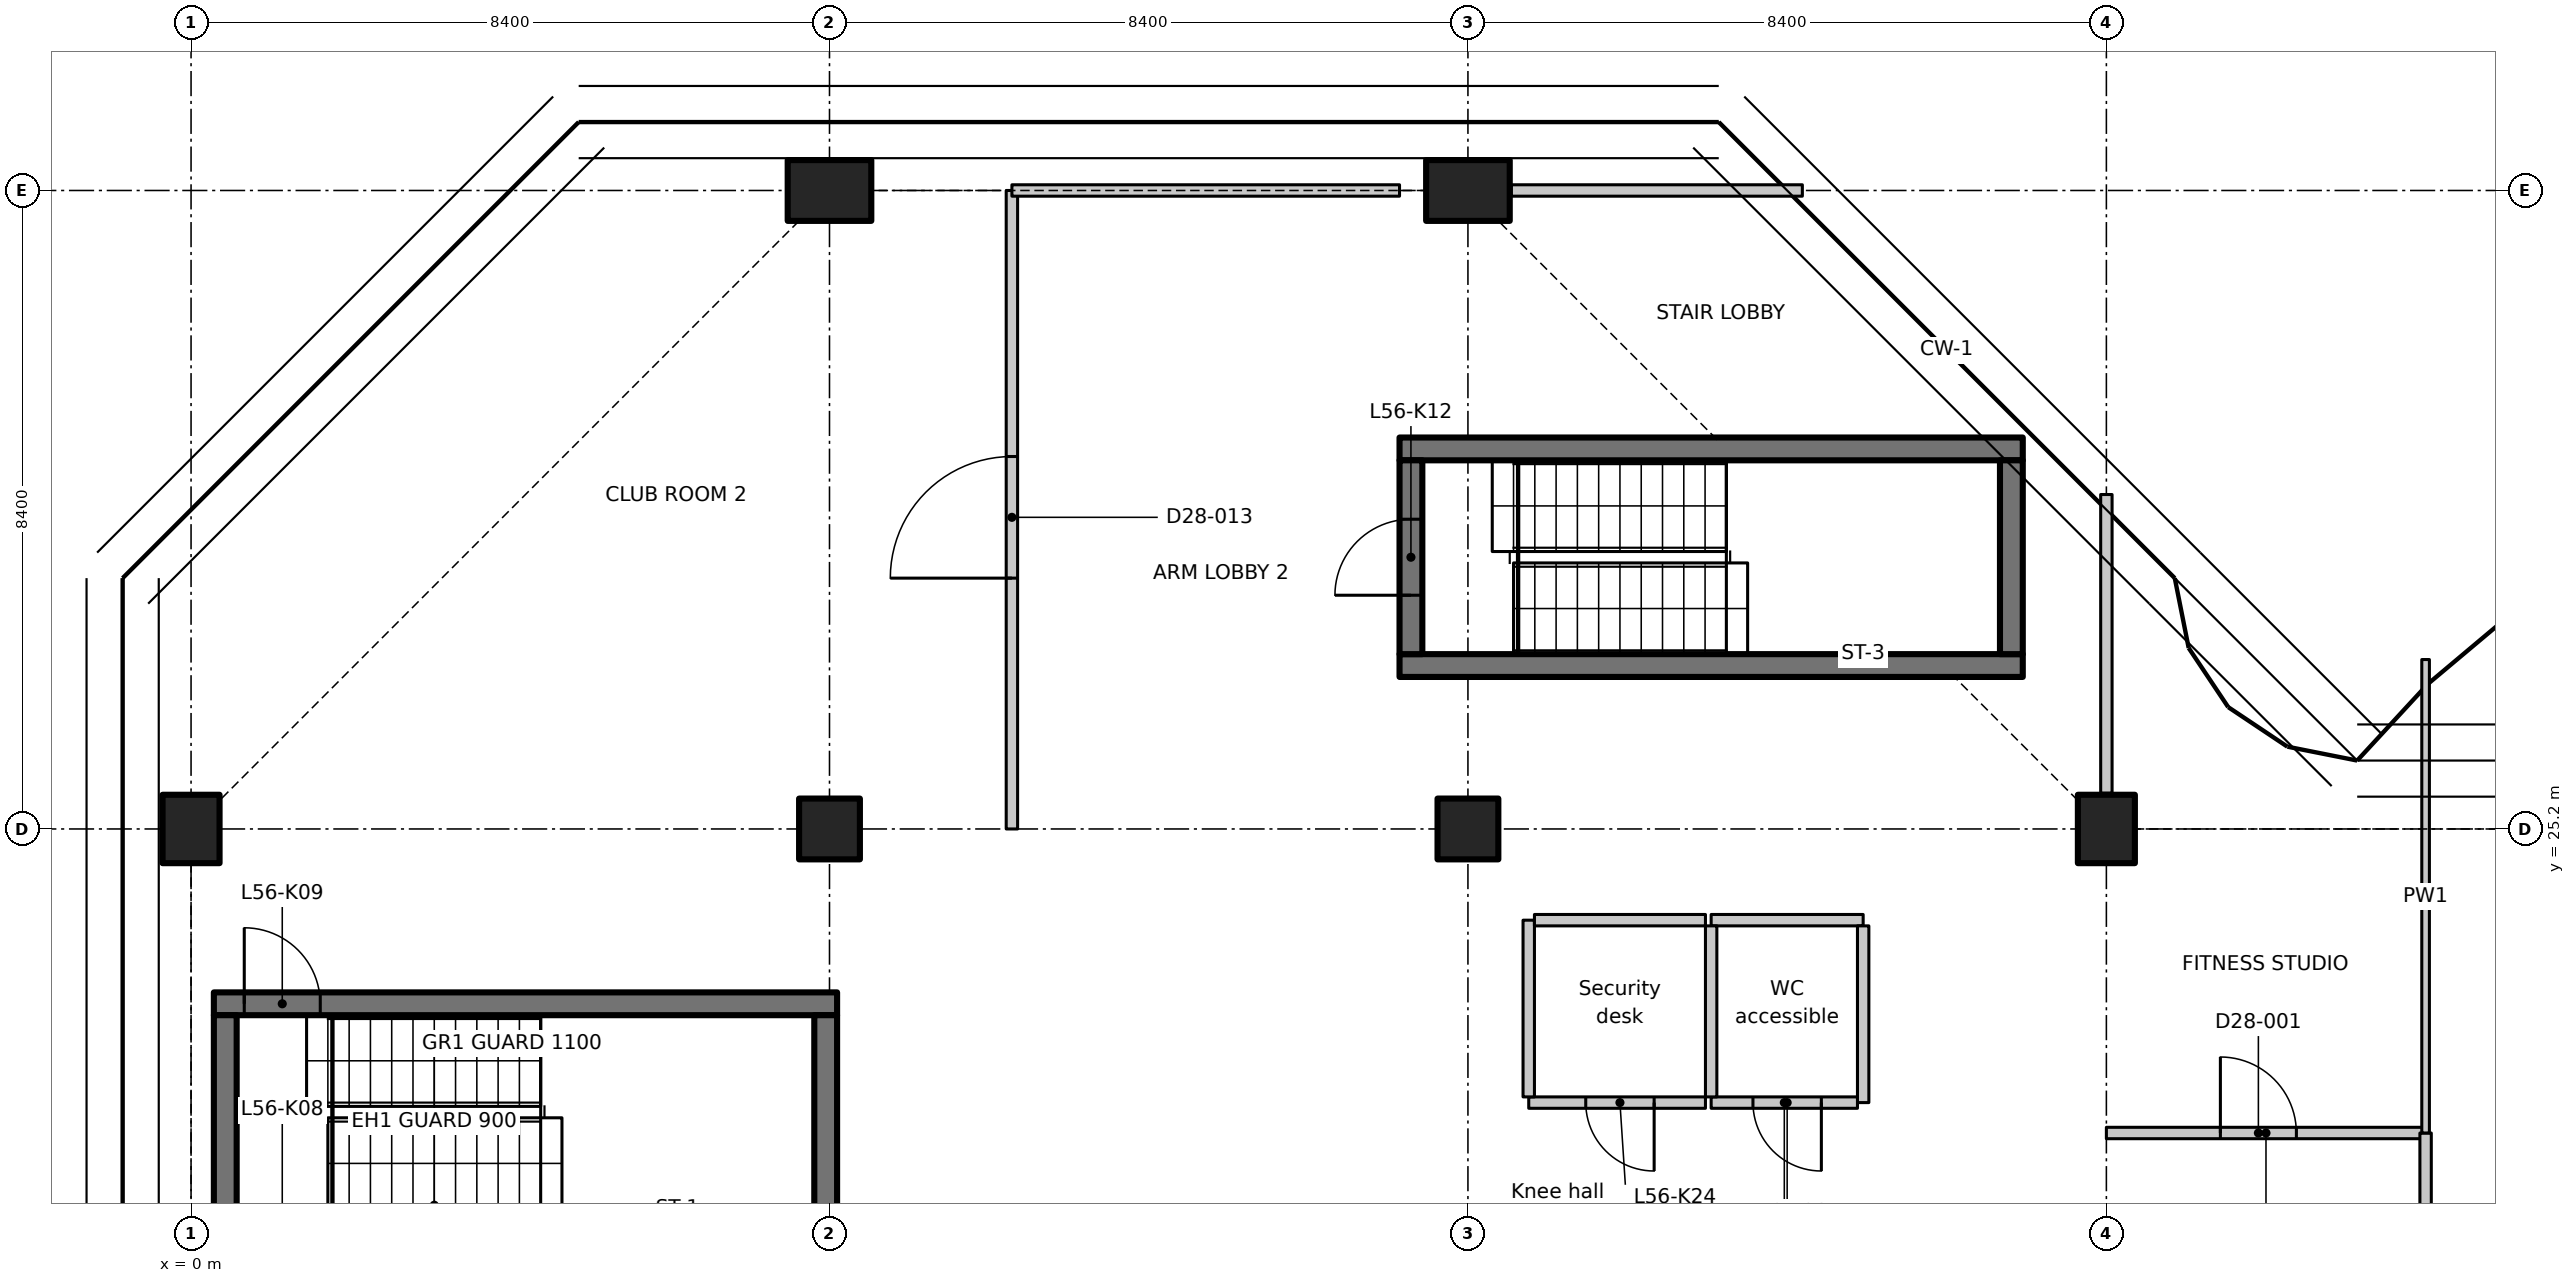
"""IFC4 building model, lengths in metres.
Left out: names, types, materials, properties, quantities, classifications, styles, units other than length and angle.
Written with IfcOpenShell. Run it as: python <this file> out.ifc"""

import sys

from ifc_helpers import new_model, si_unit, direction, frame, frame_2d, origin, origin_2d, place, context, subcontext, project, spatial, polyline, rectangle, outline, extrude, element, fill, save


model = new_model("IFC4")
c1 = context("Model", 3, precision=1e-05, world=origin(), true_north=direction((0.0, 1.0)))
c2 = subcontext(c1, "Body", "Model", "MODEL_VIEW")
j1 = project(units=[si_unit("LENGTHUNIT", "METRE"), si_unit("PLANEANGLEUNIT", "RADIAN")], contexts=[c1])
p1 = place(None, origin())
s1 = spatial("IfcSite", under=j1, at=p1, CompositionType="ELEMENT")
p2 = place(p1, origin())
s2 = spatial("IfcBuilding", under=s1, at=p2, CompositionType="ELEMENT")
p3 = place(p2, frame((0.0, 0.0, 222.9)))
s3 = spatial("IfcBuildingStorey", under=s2, at=p3, CompositionType="ELEMENT", Elevation=222.9)
p4 = place(p3, frame((0.0, 25.2, 0.0), z_axis=(0.0, 0.0, 1.0), x_axis=(1.0, 0.0, 0.0)))
e1 = element("IfcColumn", 1, at=p4, inside=s3, PredefinedType="COLUMN", context=c2, shape_type="SweptSolid", body=[
    extrude(rectangle(XDim=0.75, YDim=0.9, at=origin_2d()), origin(), (0.0, 0.0, 1.0), 3.35),
])
p5 = place(p3, frame((8.4, 25.2, 0.0), z_axis=(0.0, 0.0, 1.0), x_axis=(1.0, 0.0, 0.0)))
e2 = element("IfcColumn", 2, at=p5, inside=s3, PredefinedType="COLUMN", context=c2, shape_type="SweptSolid", body=[
    extrude(rectangle(XDim=0.8, YDim=0.8, at=origin_2d()), origin(), (0.0, 0.0, 1.0), 3.35),
])
p6 = place(p3, frame((8.4, 33.6, 0.0), z_axis=(0.0, 0.0, 1.0), x_axis=(0.0, 1.0, 0.0)))
e3 = element("IfcColumn", 3, at=p6, inside=s3, PredefinedType="COLUMN", context=c2, shape_type="SweptSolid", body=[
    extrude(rectangle(XDim=0.8, YDim=1.1, at=origin_2d()), origin(), (0.0, 0.0, 1.0), 3.35),
])
p7 = place(p3, frame((16.8, 25.2, 0.0), z_axis=(0.0, 0.0, 1.0), x_axis=(1.0, 0.0, 0.0)))
e4 = element("IfcColumn", 4, at=p7, inside=s3, PredefinedType="COLUMN", context=c2, shape_type="SweptSolid", body=[
    extrude(rectangle(XDim=0.8, YDim=0.8, at=origin_2d()), origin(), (0.0, 0.0, 1.0), 3.35),
])
p8 = place(p3, frame((16.8, 33.6, 0.0), z_axis=(0.0, 0.0, 1.0), x_axis=(0.0, 1.0, 0.0)))
e5 = element("IfcColumn", 5, at=p8, inside=s3, PredefinedType="COLUMN", context=c2, shape_type="SweptSolid", body=[
    extrude(rectangle(XDim=0.8, YDim=1.1, at=origin_2d()), origin(), (0.0, 0.0, 1.0), 3.35),
])
p9 = place(p3, frame((25.2, 25.2, 0.0), z_axis=(0.0, 0.0, 1.0), x_axis=(1.0, 0.0, 0.0)))
e6 = element("IfcColumn", 6, at=p9, inside=s3, PredefinedType="COLUMN", context=c2, shape_type="SweptSolid", body=[
    extrude(rectangle(XDim=0.75, YDim=0.9, at=origin_2d()), origin(), (0.0, 0.0, 1.0), 3.35),
])
p10 = place(p3, frame((0.3, 22.9, 0.0), z_axis=(0.0, 0.0, 1.0), x_axis=(1.0, 0.0, 0.0)))
e7 = element("IfcWall", 7, at=p10, inside=s3, PredefinedType="SHEAR", context=c2, shape_type="SweptSolid", body=[
    extrude(rectangle(XDim=8.2, YDim=0.3, at=frame_2d((4.1, 0.0))), origin(), (0.0, 0.0, 1.0), 3.35),
])
p11 = place(p10, frame((0.4, 0.0, 0.0)))
e8 = element("IfcOpeningElement", 8, at=p11, cuts=e7, PredefinedType="OPENING", context=c2, shape_type="SweptSolid", body=[
    extrude(rectangle(XDim=1.0, YDim=2.1, at=frame_2d((0.5, 1.05))), frame((0.0, 0.16, 0.0), z_axis=(0.0, -1.0, 0.0), x_axis=(1.0, 0.0, 0.0)), (0.0, 0.0, 1.0), 0.32),
])
for number, where, z_axis, x_axis in (
    (9, (0.45, 20.2, 0.0), (0.0, 0.0, 1.0), (0.0, 1.0, 0.0)),
    (10, (8.35, 20.2, 0.0), (0.0, 0.0, 1.0), (0.0, 1.0, 0.0)),
):
    element("IfcWall", number, at=place(p3, frame(where, z_axis=z_axis, x_axis=x_axis)), inside=s3, PredefinedType="SHEAR", context=c2, shape_type="SweptSolid", body=[
        extrude(rectangle(XDim=2.55, YDim=0.3, at=frame_2d((1.275, 0.0))), origin(), (0.0, 0.0, 1.0), 3.35),
    ])
for number, where, z_axis, x_axis in (
    (11, (15.9, 27.35, 0.0), (0.0, 0.0, 1.0), (1.0, 0.0, 0.0)),
    (12, (15.9, 30.2, 0.0), (0.0, 0.0, 1.0), (1.0, 0.0, 0.0)),
):
    element("IfcWall", number, at=place(p3, frame(where, z_axis=z_axis, x_axis=x_axis)), inside=s3, PredefinedType="SHEAR", context=c2, shape_type="SweptSolid", body=[
        extrude(rectangle(XDim=8.2, YDim=0.3, at=frame_2d((4.1, 0.0))), origin(), (0.0, 0.0, 1.0), 3.35),
    ])
p12 = place(p3, frame((16.05, 27.5, 0.0), z_axis=(0.0, 0.0, 1.0), x_axis=(0.0, 1.0, 0.0)))
e13 = element("IfcWall", 13, at=p12, inside=s3, PredefinedType="SHEAR", context=c2, shape_type="SweptSolid", body=[
    extrude(rectangle(XDim=2.55, YDim=0.3, at=frame_2d((1.275, 0.0))), origin(), (0.0, 0.0, 1.0), 3.35),
])
p13 = place(p12, frame((0.775, 0.0, 0.0)))
e14 = element("IfcOpeningElement", 14, at=p13, cuts=e13, PredefinedType="OPENING", context=c2, shape_type="SweptSolid", body=[
    extrude(rectangle(XDim=1.0, YDim=2.1, at=frame_2d((0.5, 1.05))), frame((0.0, 0.16, 0.0), z_axis=(0.0, -1.0, 0.0), x_axis=(1.0, 0.0, 0.0)), (0.0, 0.0, 1.0), 0.32),
])
p14 = place(p3, frame((23.95, 27.5, 0.0), z_axis=(0.0, 0.0, 1.0), x_axis=(0.0, 1.0, 0.0)))
e15 = element("IfcWall", 15, at=p14, inside=s3, PredefinedType="SHEAR", context=c2, shape_type="SweptSolid", body=[
    extrude(rectangle(XDim=2.55, YDim=0.3, at=frame_2d((1.275, 0.0))), origin(), (0.0, 0.0, 1.0), 3.35),
])
p15 = place(p3, frame((20.0, 24.0, 0.0), z_axis=(0.0, 0.0, 1.0), x_axis=(1.0, 0.0, 0.0)))
e16 = element("IfcWall", 16, at=p15, inside=s3, PredefinedType="PARTITIONING", context=c2, shape_type="SweptSolid", body=[
    extrude(rectangle(XDim=2.0, YDim=0.15, at=frame_2d((1.0, 0.0))), origin(), (0.0, 0.0, 1.0), 3.35),
])
p16 = place(p3, frame((22.0, 23.925, 0.0), z_axis=(0.0, 0.0, 1.0), x_axis=(0.0, -1.0, 0.0)))
e17 = element("IfcWall", 17, at=p16, inside=s3, PredefinedType="PARTITIONING", context=c2, shape_type="SweptSolid", body=[
    extrude(rectangle(XDim=2.325, YDim=0.15, at=frame_2d((1.163, 0.0))), origin(), (0.0, 0.0, 1.0), 3.35),
])
p17 = place(p3, frame((21.925, 21.6, 0.0), z_axis=(0.0, 0.0, 1.0), x_axis=(-1.0, 0.0, 0.0)))
e18 = element("IfcWall", 18, at=p17, inside=s3, PredefinedType="PARTITIONING", context=c2, shape_type="SweptSolid", body=[
    extrude(rectangle(XDim=1.925, YDim=0.15, at=frame_2d((0.962, 0.0))), origin(), (0.0, 0.0, 1.0), 3.35),
])
p18 = place(p17, frame((0.475, 0.0, 0.0)))
e19 = element("IfcOpeningElement", 19, at=p18, cuts=e18, PredefinedType="OPENING", context=c2, shape_type="SweptSolid", body=[
    extrude(rectangle(XDim=0.9, YDim=2.1, at=frame_2d((0.45, 1.05))), frame((0.0, 0.085, 0.0), z_axis=(0.0, -1.0, 0.0), x_axis=(1.0, 0.0, 0.0)), (0.0, 0.0, 1.0), 0.17),
])
p19 = place(p3, frame((20.0, 21.675, 0.0), z_axis=(0.0, 0.0, 1.0), x_axis=(0.0, 1.0, 0.0)))
e20 = element("IfcWall", 20, at=p19, inside=s3, PredefinedType="PARTITIONING", context=c2, shape_type="SweptSolid", body=[
    extrude(rectangle(XDim=2.25, YDim=0.15, at=frame_2d((1.125, 0.0))), origin(), (0.0, 0.0, 1.0), 3.35),
])
p20 = place(p3, frame((19.925, 21.6, 0.0), z_axis=(0.0, 0.0, 1.0), x_axis=(-1.0, 0.0, 0.0)))
e21 = element("IfcWall", 21, at=p20, inside=s3, PredefinedType="PARTITIONING", context=c2, shape_type="SweptSolid", body=[
    extrude(rectangle(XDim=2.325, YDim=0.15, at=frame_2d((1.163, 0.0))), origin(), (0.0, 0.0, 1.0), 3.35),
])
p21 = place(p20, frame((0.675, 0.0, 0.0)))
e22 = element("IfcOpeningElement", 22, at=p21, cuts=e21, PredefinedType="OPENING", context=c2, shape_type="SweptSolid", body=[
    extrude(rectangle(XDim=0.9, YDim=2.1, at=frame_2d((0.45, 1.05))), frame((0.0, 0.085, 0.0), z_axis=(0.0, -1.0, 0.0), x_axis=(1.0, 0.0, 0.0)), (0.0, 0.0, 1.0), 0.17),
])
p22 = place(p3, frame((17.6, 21.675, 0.0), z_axis=(0.0, 0.0, 1.0), x_axis=(0.0, 1.0, 0.0)))
e23 = element("IfcWall", 23, at=p22, inside=s3, PredefinedType="PARTITIONING", context=c2, shape_type="SweptSolid", body=[
    extrude(rectangle(XDim=2.325, YDim=0.15, at=frame_2d((1.163, 0.0))), origin(), (0.0, 0.0, 1.0), 3.35),
])
p23 = place(p3, frame((17.675, 24.0, 0.0), z_axis=(0.0, 0.0, 1.0), x_axis=(1.0, 0.0, 0.0)))
e24 = element("IfcWall", 24, at=p23, inside=s3, PredefinedType="PARTITIONING", context=c2, shape_type="SweptSolid", body=[
    extrude(rectangle(XDim=2.25, YDim=0.15, at=frame_2d((1.125, 0.0))), origin(), (0.0, 0.0, 1.0), 3.35),
])
p24 = place(p3, frame((25.2, 21.2, 0.0), z_axis=(0.0, 0.0, 1.0), x_axis=(1.0, 0.0, 0.0)))
e25 = element("IfcWall", 25, at=p24, inside=s3, PredefinedType="PARTITIONING", context=c2, shape_type="SweptSolid", body=[
    extrude(rectangle(XDim=4.2, YDim=0.15, at=frame_2d((2.1, 0.0))), origin(), (0.0, 0.0, 1.0), 3.33),
])
p25 = place(p24, frame((1.5, 0.0, 0.0)))
e26 = element("IfcOpeningElement", 26, at=p25, cuts=e25, PredefinedType="OPENING", context=c2, shape_type="SweptSolid", body=[
    extrude(rectangle(XDim=1.0, YDim=2.1, at=frame_2d((0.5, 1.05))), frame((0.0, 0.085, 0.0), z_axis=(0.0, -1.0, 0.0), x_axis=(1.0, 0.0, 0.0)), (0.0, 0.0, 1.0), 0.17),
])
p26 = place(p3, frame((29.4, 21.2, 0.0), z_axis=(0.0, 0.0, 1.0), x_axis=(0.0, -1.0, 0.0)))
e27 = element("IfcWall", 27, at=p26, inside=s3, PredefinedType="PARTITIONING", context=c2, shape_type="SweptSolid", body=[
    extrude(rectangle(XDim=8.2, YDim=0.15, at=frame_2d((4.1, 0.0))), origin(), (0.0, 0.0, 1.0), 3.33),
])
p27 = place(p3, frame((29.4, 27.429, 0.0), z_axis=(0.0, 0.0, 1.0), x_axis=(0.0, -1.0, 0.0)))
e28 = element("IfcWall", 28, at=p27, inside=s3, PredefinedType="PARTITIONING", context=c2, shape_type="SweptSolid", body=[
    extrude(outline(polyline([(0.0, 0.0), (6.229, 0.0), (6.229, 3.33), (2.679, 3.33), (2.677, 2.98), (1.781, 2.98), (1.779, 3.33), (0.154, 3.33), (0.0, 3.33), (0.0, 0.0)])), frame((0.0, 0.05, 0.0), z_axis=(0.0, -1.0, 0.0), x_axis=(1.0, 0.0, 0.0)), (0.0, 0.0, 1.0), 0.1),
])
p28 = place(p3, frame((25.2, 25.67, 0.0), z_axis=(0.0, 0.0, 1.0), x_axis=(0.0, 1.0, 0.0)))
e29 = element("IfcWall", 29, at=p28, inside=s3, PredefinedType="PARTITIONING", context=c2, shape_type="SweptSolid", body=[
    extrude(rectangle(XDim=3.93, YDim=0.15, at=frame_2d((1.965, 0.0))), origin(), (0.0, 0.0, 1.0), 2.98),
])
p29 = place(p3, frame((10.8, 25.2, 0.0), z_axis=(0.0, 0.0, 1.0), x_axis=(0.0, 1.0, 0.0)))
e30 = element("IfcWall", 30, at=p29, inside=s3, PredefinedType="PARTITIONING", context=c2, shape_type="SweptSolid", body=[
    extrude(outline(polyline([(0.0, 0.0), (8.4, 0.0), (8.4, 2.98), (7.952, 2.98), (7.95, 3.33), (0.0, 3.33), (0.0, 0.0)])), frame((0.0, 0.075, 0.0), z_axis=(0.0, -1.0, 0.0), x_axis=(1.0, 0.0, 0.0)), (0.0, 0.0, 1.0), 0.15),
])
p30 = place(p29, frame((3.3, 0.0, 0.0)))
e31 = element("IfcOpeningElement", 31, at=p30, cuts=e30, PredefinedType="OPENING", context=c2, shape_type="SweptSolid", body=[
    extrude(rectangle(XDim=1.6, YDim=2.1, at=frame_2d((0.8, 1.05))), frame((0.0, 0.085, 0.0), z_axis=(0.0, -1.0, 0.0), x_axis=(1.0, 0.0, 0.0)), (0.0, 0.0, 1.0), 0.17),
])
p31 = place(p3, frame((10.8, 33.6, 0.0), z_axis=(0.0, 0.0, 1.0), x_axis=(1.0, 0.0, 0.0)))
e32 = element("IfcWall", 32, at=p31, inside=s3, PredefinedType="PARTITIONING", context=c2, shape_type="SweptSolid", body=[
    extrude(outline(polyline([(0.0, 0.0), (5.1, 0.0), (5.1, 2.98), (0.0, 2.98), (0.0, 0.0)])), frame((0.0, 0.075, 0.0), z_axis=(0.0, -1.0, 0.0), x_axis=(1.0, 0.0, 0.0)), (0.0, 0.0, 1.0), 0.15),
])
p32 = place(p3, frame((17.37, 33.6, 0.0), z_axis=(0.0, 0.0, 1.0), x_axis=(1.0, 0.0, 0.0)))
e33 = element("IfcWall", 33, at=p32, inside=s3, PredefinedType="PARTITIONING", context=c2, shape_type="SweptSolid", body=[
    extrude(rectangle(XDim=3.83, YDim=0.15, at=frame_2d((1.915, 0.0))), origin(), (0.0, 0.0, 1.0), 2.98),
])
p33 = place(p11, origin())
e34 = element("IfcDoor", 34, at=p33, inside=s3, OperationType="SINGLE_SWING_RIGHT", PredefinedType="DOOR", context=c2, shape_type="SweptSolid", body=[
    extrude(rectangle(XDim=1.0, YDim=2.1, at=frame_2d((0.5, 1.05))), frame((0.0, 0.025, 0.0), z_axis=(0.0, -1.0, 0.0), x_axis=(1.0, 0.0, 0.0)), (0.0, 0.0, 1.0), 0.05),
])
fill(e8, e34)
p34 = place(p13, origin())
e35 = element("IfcDoor", 35, at=p34, inside=s3, OperationType="SINGLE_SWING_LEFT", PredefinedType="DOOR", context=c2, shape_type="SweptSolid", body=[
    extrude(rectangle(XDim=1.0, YDim=2.1, at=frame_2d((0.5, 1.05))), frame((0.0, 0.025, 0.0), z_axis=(0.0, -1.0, 0.0), x_axis=(1.0, 0.0, 0.0)), (0.0, 0.0, 1.0), 0.05),
])
fill(e14, e35)
p35 = place(p18, origin())
e36 = element("IfcDoor", 36, at=p35, inside=s3, OperationType="SINGLE_SWING_RIGHT", PredefinedType="DOOR", context=c2, shape_type="SweptSolid", body=[
    extrude(rectangle(XDim=0.9, YDim=2.1, at=frame_2d((0.45, 1.05))), frame((0.0, 0.025, 0.0), z_axis=(0.0, -1.0, 0.0), x_axis=(1.0, 0.0, 0.0)), (0.0, 0.0, 1.0), 0.05),
])
fill(e19, e36)
p36 = place(p21, origin())
e37 = element("IfcDoor", 37, at=p36, inside=s3, OperationType="SINGLE_SWING_LEFT", PredefinedType="DOOR", context=c2, shape_type="SweptSolid", body=[
    extrude(rectangle(XDim=0.9, YDim=2.1, at=frame_2d((0.45, 1.05))), frame((0.0, 0.025, 0.0), z_axis=(0.0, -1.0, 0.0), x_axis=(1.0, 0.0, 0.0)), (0.0, 0.0, 1.0), 0.05),
])
fill(e22, e37)
p37 = place(p25, origin())
e38 = element("IfcDoor", 38, at=p37, inside=s3, OperationType="SINGLE_SWING_LEFT", PredefinedType="DOOR", context=c2, shape_type="SweptSolid", body=[
    extrude(rectangle(XDim=1.0, YDim=2.1, at=frame_2d((0.5, 1.05))), frame((0.0, 0.025, 0.0), z_axis=(0.0, -1.0, 0.0), x_axis=(1.0, 0.0, 0.0)), (0.0, 0.0, 1.0), 0.05),
])
fill(e26, e38)
p38 = place(p30, origin())
e39 = element("IfcDoor", 39, at=p38, inside=s3, OperationType="DOUBLE_DOOR_SINGLE_SWING", PredefinedType="DOOR", context=c2, shape_type="SweptSolid", body=[
    extrude(rectangle(XDim=1.6, YDim=2.1, at=frame_2d((0.8, 1.05))), frame((0.0, 0.025, 0.0), z_axis=(0.0, -1.0, 0.0), x_axis=(1.0, 0.0, 0.0)), (0.0, 0.0, 1.0), 0.05),
])
fill(e31, e39)
save(model, sys.argv[1])
